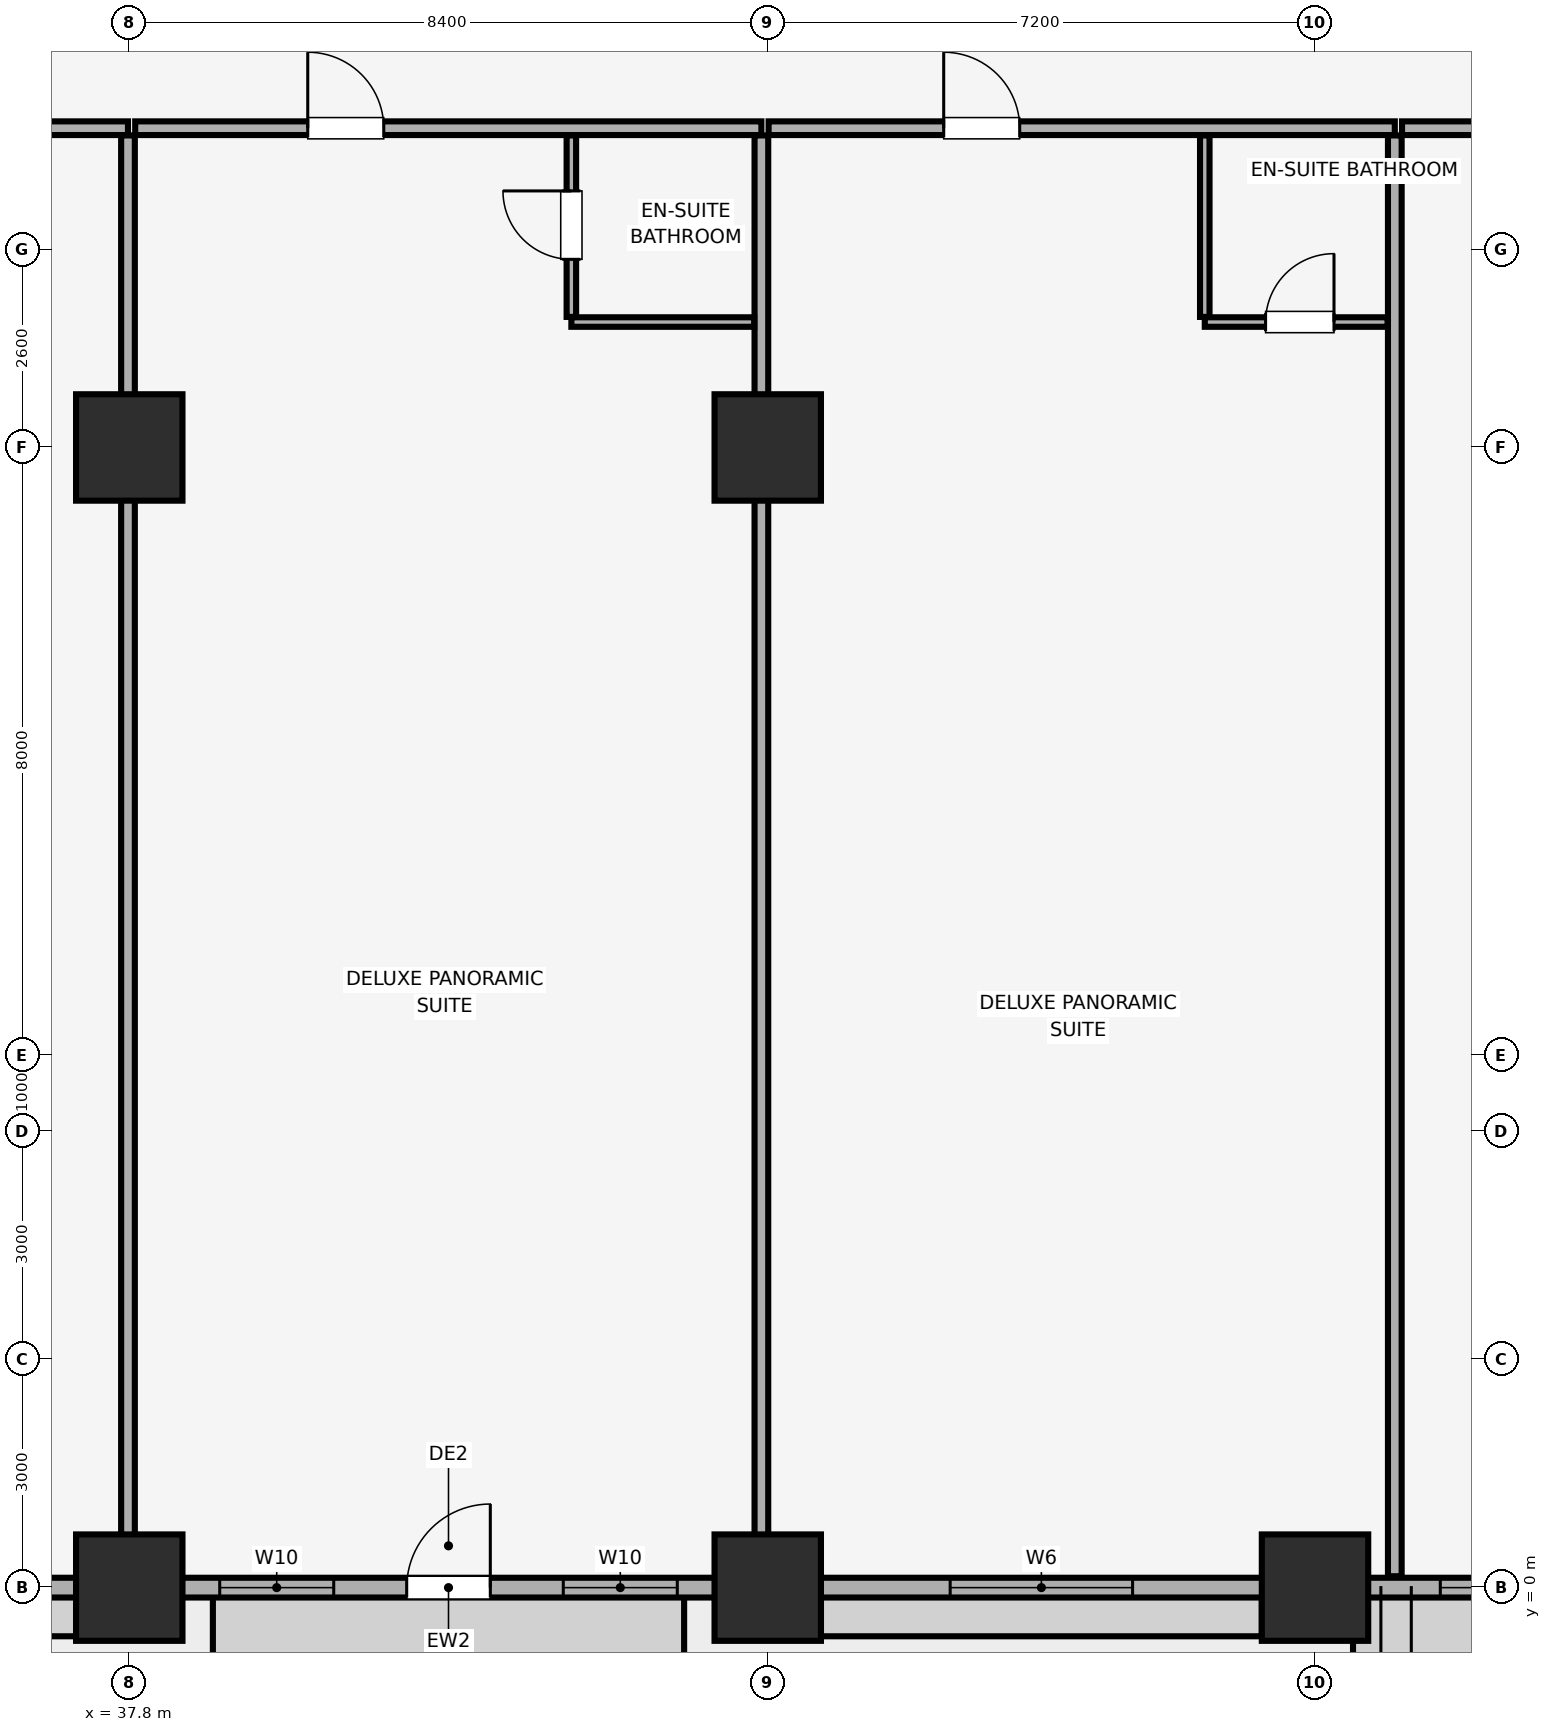
"""IFC4 building model, lengths in metres.
Left out: names, types, materials, properties, quantities, classifications, styles, units other than length and angle.
Written with IfcOpenShell. Run it as: python <this file> out.ifc"""

import sys

from ifc_helpers import new_model, si_unit, direction, frame, frame_2d, origin, origin_2d, place, context, subcontext, project, spatial, rectangle, extrude, element, fill, save


model = new_model("IFC4")
c1 = context("Model", 3, precision=1e-05, world=origin(), true_north=direction((0.0, 1.0)))
c2 = subcontext(c1, "Body", "Model", "MODEL_VIEW")
j1 = project(units=[si_unit("LENGTHUNIT", "METRE"), si_unit("PLANEANGLEUNIT", "RADIAN")], contexts=[c1])
p1 = place(None, origin())
s1 = spatial("IfcSite", under=j1, at=p1, CompositionType="ELEMENT")
p2 = place(p1, origin())
s2 = spatial("IfcBuilding", under=s1, at=p2, CompositionType="ELEMENT")
p3 = place(p2, frame((0.0, 0.0, 72.65)))
s3 = spatial("IfcBuildingStorey", under=s2, at=p3, CompositionType="ELEMENT", Elevation=72.65)
for number, where, z_axis, x_axis in (
    (1, (37.8, 0.0, 0.0), (0.0, 0.0, 1.0), (1.0, 0.0, 0.0)),
    (2, (46.2, 0.0, 0.0), (0.0, 0.0, 1.0), (1.0, 0.0, 0.0)),
    (3, (53.4, 0.0, 0.0), (0.0, 0.0, 1.0), (1.0, 0.0, 0.0)),
    (4, (37.8, 15.0, 0.0), (0.0, 0.0, 1.0), (1.0, 0.0, 0.0)),
    (5, (46.2, 15.0, 0.0), (0.0, 0.0, 1.0), (1.0, 0.0, 0.0)),
):
    element("IfcColumn", number, at=place(p3, frame(where, z_axis=z_axis, x_axis=x_axis)), inside=s3, PredefinedType="COLUMN", context=c2, shape_type="SweptSolid", body=[
        extrude(rectangle(XDim=1.4, YDim=1.4, at=origin_2d()), origin(), (0.0, 0.0, 1.0), 3.51),
    ])
p4 = place(p3, frame((4.2, 0.0, 0.0), z_axis=(0.0, 0.0, 1.0), x_axis=(1.0, 0.0, 0.0)))
e6 = element("IfcWall", 6, at=p4, inside=s3, PredefinedType="SOLIDWALL", context=c2, shape_type="SweptSolid", body=[
    extrude(rectangle(XDim=75.6, YDim=0.26, at=frame_2d((37.8, 0.0))), origin(), (0.0, 0.0, 1.0), 2.56),
])
p5 = place(p4, frame((21.383, 0.0, 0.0)))
e7 = element("IfcOpeningElement", 7, at=p5, cuts=e6, PredefinedType="OPENING", context=c2, shape_type="SweptSolid", body=[
    extrude(rectangle(XDim=1.1, YDim=2.15, at=frame_2d((0.55, 1.075))), frame((0.0, 0.14, 0.0), z_axis=(0.0, -1.0, 0.0), x_axis=(1.0, 0.0, 0.0)), (0.0, 0.0, 1.0), 0.28),
])
p6 = place(p4, frame((37.25, 0.0, 0.0)))
e8 = element("IfcOpeningElement", 8, at=p6, cuts=e6, PredefinedType="OPENING", context=c2, shape_type="SweptSolid", body=[
    extrude(rectangle(XDim=1.1, YDim=2.15, at=frame_2d((0.55, 1.075))), frame((0.0, 0.14, 0.0), z_axis=(0.0, -1.0, 0.0), x_axis=(1.0, 0.0, 0.0)), (0.0, 0.0, 1.0), 0.28),
])
p7 = place(p4, frame((53.117, 0.0, 0.0)))
e9 = element("IfcOpeningElement", 9, at=p7, cuts=e6, PredefinedType="OPENING", context=c2, shape_type="SweptSolid", body=[
    extrude(rectangle(XDim=1.1, YDim=2.15, at=frame_2d((0.55, 1.075))), frame((0.0, 0.14, 0.0), z_axis=(0.0, -1.0, 0.0), x_axis=(1.0, 0.0, 0.0)), (0.0, 0.0, 1.0), 0.28),
])
p8 = place(p4, frame((1.035, 0.0, 0.85)))
e10 = element("IfcOpeningElement", 10, at=p8, cuts=e6, PredefinedType="OPENING", context=c2, shape_type="SweptSolid", body=[
    extrude(rectangle(XDim=2.4, YDim=1.5, at=frame_2d((1.2, 0.75))), frame((0.0, 0.14, 0.0), z_axis=(0.0, -1.0, 0.0), x_axis=(1.0, 0.0, 0.0)), (0.0, 0.0, 1.0), 0.28),
])
p9 = place(p4, frame((5.691, 0.0, 0.85)))
e11 = element("IfcOpeningElement", 11, at=p9, cuts=e6, PredefinedType="OPENING", context=c2, shape_type="SweptSolid", body=[
    extrude(rectangle(XDim=2.4, YDim=1.5, at=frame_2d((1.2, 0.75))), frame((0.0, 0.14, 0.0), z_axis=(0.0, -1.0, 0.0), x_axis=(1.0, 0.0, 0.0)), (0.0, 0.0, 1.0), 0.28),
])
p10 = place(p4, frame((9.342, 0.0, 0.85)))
e12 = element("IfcOpeningElement", 12, at=p10, cuts=e6, PredefinedType="OPENING", context=c2, shape_type="SweptSolid", body=[
    extrude(rectangle(XDim=1.5, YDim=1.4, at=frame_2d((0.75, 0.7))), frame((0.0, 0.14, 0.0), z_axis=(0.0, -1.0, 0.0), x_axis=(1.0, 0.0, 0.0)), (0.0, 0.0, 1.0), 0.28),
])
p11 = place(p4, frame((13.458, 0.0, 0.85)))
e13 = element("IfcOpeningElement", 13, at=p11, cuts=e6, PredefinedType="OPENING", context=c2, shape_type="SweptSolid", body=[
    extrude(rectangle(XDim=2.4, YDim=1.5, at=frame_2d((1.2, 0.75))), frame((0.0, 0.14, 0.0), z_axis=(0.0, -1.0, 0.0), x_axis=(1.0, 0.0, 0.0)), (0.0, 0.0, 1.0), 0.28),
])
p12 = place(p4, frame((23.202, 0.0, 0.85)))
e14 = element("IfcOpeningElement", 14, at=p12, cuts=e6, PredefinedType="OPENING", context=c2, shape_type="SweptSolid", body=[
    extrude(rectangle(XDim=1.5, YDim=1.4, at=frame_2d((0.75, 0.7))), frame((0.0, 0.14, 0.0), z_axis=(0.0, -1.0, 0.0), x_axis=(1.0, 0.0, 0.0)), (0.0, 0.0, 1.0), 0.28),
])
p13 = place(p4, frame((28.8, 0.0, 0.85)))
e15 = element("IfcOpeningElement", 15, at=p13, cuts=e6, PredefinedType="OPENING", context=c2, shape_type="SweptSolid", body=[
    extrude(rectangle(XDim=2.4, YDim=1.5, at=frame_2d((1.2, 0.75))), frame((0.0, 0.14, 0.0), z_axis=(0.0, -1.0, 0.0), x_axis=(1.0, 0.0, 0.0)), (0.0, 0.0, 1.0), 0.28),
])
p14 = place(p4, frame((34.79, 0.0, 0.85)))
e16 = element("IfcOpeningElement", 16, at=p14, cuts=e6, PredefinedType="OPENING", context=c2, shape_type="SweptSolid", body=[
    extrude(rectangle(XDim=1.5, YDim=1.4, at=frame_2d((0.75, 0.7))), frame((0.0, 0.14, 0.0), z_axis=(0.0, -1.0, 0.0), x_axis=(1.0, 0.0, 0.0)), (0.0, 0.0, 1.0), 0.28),
])
p15 = place(p4, frame((39.31, 0.0, 0.85)))
e17 = element("IfcOpeningElement", 17, at=p15, cuts=e6, PredefinedType="OPENING", context=c2, shape_type="SweptSolid", body=[
    extrude(rectangle(XDim=1.5, YDim=1.4, at=frame_2d((0.75, 0.7))), frame((0.0, 0.14, 0.0), z_axis=(0.0, -1.0, 0.0), x_axis=(1.0, 0.0, 0.0)), (0.0, 0.0, 1.0), 0.28),
])
p16 = place(p4, frame((44.4, 0.0, 0.85)))
e18 = element("IfcOpeningElement", 18, at=p16, cuts=e6, PredefinedType="OPENING", context=c2, shape_type="SweptSolid", body=[
    extrude(rectangle(XDim=2.4, YDim=1.5, at=frame_2d((1.2, 0.75))), frame((0.0, 0.14, 0.0), z_axis=(0.0, -1.0, 0.0), x_axis=(1.0, 0.0, 0.0)), (0.0, 0.0, 1.0), 0.28),
])
p17 = place(p4, frame((50.848, 0.0, 0.85)))
e19 = element("IfcOpeningElement", 19, at=p17, cuts=e6, PredefinedType="OPENING", context=c2, shape_type="SweptSolid", body=[
    extrude(rectangle(XDim=1.5, YDim=1.4, at=frame_2d((0.75, 0.7))), frame((0.0, 0.14, 0.0), z_axis=(0.0, -1.0, 0.0), x_axis=(1.0, 0.0, 0.0)), (0.0, 0.0, 1.0), 0.28),
])
p18 = place(p4, frame((59.691, 0.0, 0.85)))
e20 = element("IfcOpeningElement", 20, at=p18, cuts=e6, PredefinedType="OPENING", context=c2, shape_type="SweptSolid", body=[
    extrude(rectangle(XDim=2.4, YDim=1.5, at=frame_2d((1.2, 0.75))), frame((0.0, 0.14, 0.0), z_axis=(0.0, -1.0, 0.0), x_axis=(1.0, 0.0, 0.0)), (0.0, 0.0, 1.0), 0.28),
])
p19 = place(p4, frame((64.708, 0.0, 0.85)))
e21 = element("IfcOpeningElement", 21, at=p19, cuts=e6, PredefinedType="OPENING", context=c2, shape_type="SweptSolid", body=[
    extrude(rectangle(XDim=1.5, YDim=1.4, at=frame_2d((0.75, 0.7))), frame((0.0, 0.14, 0.0), z_axis=(0.0, -1.0, 0.0), x_axis=(1.0, 0.0, 0.0)), (0.0, 0.0, 1.0), 0.28),
])
p20 = place(p4, frame((67.458, 0.0, 0.85)))
e22 = element("IfcOpeningElement", 22, at=p20, cuts=e6, PredefinedType="OPENING", context=c2, shape_type="SweptSolid", body=[
    extrude(rectangle(XDim=2.4, YDim=1.5, at=frame_2d((1.2, 0.75))), frame((0.0, 0.14, 0.0), z_axis=(0.0, -1.0, 0.0), x_axis=(1.0, 0.0, 0.0)), (0.0, 0.0, 1.0), 0.28),
])
p21 = place(p4, frame((72.165, 0.0, 0.85)))
e23 = element("IfcOpeningElement", 23, at=p21, cuts=e6, PredefinedType="OPENING", context=c2, shape_type="SweptSolid", body=[
    extrude(rectangle(XDim=2.4, YDim=1.5, at=frame_2d((1.2, 0.75))), frame((0.0, 0.14, 0.0), z_axis=(0.0, -1.0, 0.0), x_axis=(1.0, 0.0, 0.0)), (0.0, 0.0, 1.0), 0.28),
])
p22 = place(p3, frame((29.545, 19.2, 0.0), z_axis=(0.0, 0.0, 1.0), x_axis=(1.0, 0.0, 0.0)))
e24 = element("IfcWall", 24, at=p22, inside=s3, PredefinedType="PARTITIONING", context=c2, shape_type="SweptSolid", body=[
    extrude(rectangle(XDim=8.238, YDim=0.18, at=frame_2d((4.119, 0.0))), origin(), (0.0, 0.0, 1.0), 3.51),
])
p23 = place(p22, frame((4.89, 0.0, 0.0)))
e25 = element("IfcOpeningElement", 25, at=p23, cuts=e24, PredefinedType="OPENING", context=c2, shape_type="SweptSolid", body=[
    extrude(rectangle(XDim=1.0, YDim=2.15, at=frame_2d((0.5, 1.075))), frame((0.0, 0.1, 0.0), z_axis=(0.0, -1.0, 0.0), x_axis=(1.0, 0.0, 0.0)), (0.0, 0.0, 1.0), 0.2),
])
p24 = place(p3, frame((37.783, 0.15, 0.0), z_axis=(0.0, 0.0, 1.0), x_axis=(0.0, 1.0, 0.0)))
e26 = element("IfcWall", 26, at=p24, inside=s3, PredefinedType="PARTITIONING", context=c2, shape_type="SweptSolid", body=[
    extrude(rectangle(XDim=18.955, YDim=0.18, at=frame_2d((9.478, 0.0))), origin(), (0.0, 0.0, 1.0), 2.898),
])
p25 = place(p3, frame((37.878, 19.2, 0.0), z_axis=(0.0, 0.0, 1.0), x_axis=(1.0, 0.0, 0.0)))
e27 = element("IfcWall", 27, at=p25, inside=s3, PredefinedType="PARTITIONING", context=c2, shape_type="SweptSolid", body=[
    extrude(rectangle(XDim=8.238, YDim=0.18, at=frame_2d((4.119, 0.0))), origin(), (0.0, 0.0, 1.0), 3.51),
])
p26 = place(p25, frame((2.27, 0.0, 0.0)))
e28 = element("IfcOpeningElement", 28, at=p26, cuts=e27, PredefinedType="OPENING", context=c2, shape_type="SweptSolid", body=[
    extrude(rectangle(XDim=1.0, YDim=2.15, at=frame_2d((0.5, 1.075))), frame((0.0, 0.1, 0.0), z_axis=(0.0, -1.0, 0.0), x_axis=(1.0, 0.0, 0.0)), (0.0, 0.0, 1.0), 0.2),
])
p27 = place(p3, frame((46.116, 0.15, 0.0), z_axis=(0.0, 0.0, 1.0), x_axis=(0.0, 1.0, 0.0)))
e29 = element("IfcWall", 29, at=p27, inside=s3, PredefinedType="PARTITIONING", context=c2, shape_type="SweptSolid", body=[
    extrude(rectangle(XDim=18.955, YDim=0.18, at=frame_2d((9.478, 0.0))), origin(), (0.0, 0.0, 1.0), 2.898),
])
p28 = place(p3, frame((43.616, 16.65, 0.0), z_axis=(0.0, 0.0, 1.0), x_axis=(1.0, 0.0, 0.0)))
e30 = element("IfcWall", 30, at=p28, inside=s3, PredefinedType="PARTITIONING", context=c2, shape_type="SweptSolid", body=[
    extrude(rectangle(XDim=2.405, YDim=0.125, at=frame_2d((1.203, 0.0))), origin(), (0.0, 0.0, 1.0), 3.51),
])
p29 = place(p3, frame((43.616, 16.718, 0.0), z_axis=(0.0, 0.0, 1.0), x_axis=(0.0, 1.0, 0.0)))
e31 = element("IfcWall", 31, at=p29, inside=s3, PredefinedType="PARTITIONING", context=c2, shape_type="SweptSolid", body=[
    extrude(rectangle(XDim=2.387, YDim=0.125, at=frame_2d((1.194, 0.0))), origin(), (0.0, 0.0, 1.0), 3.51),
])
p30 = place(p29, frame((0.758, 0.0, 0.0)))
e32 = element("IfcOpeningElement", 32, at=p30, cuts=e31, PredefinedType="OPENING", context=c2, shape_type="SweptSolid", body=[
    extrude(rectangle(XDim=0.9, YDim=2.1, at=frame_2d((0.45, 1.05))), frame((0.0, 0.073, 0.0), z_axis=(0.0, -1.0, 0.0), x_axis=(1.0, 0.0, 0.0)), (0.0, 0.0, 1.0), 0.145),
])
p31 = place(p3, frame((46.211, 19.2, 0.0), z_axis=(0.0, 0.0, 1.0), x_axis=(1.0, 0.0, 0.0)))
e33 = element("IfcWall", 33, at=p31, inside=s3, PredefinedType="PARTITIONING", context=c2, shape_type="SweptSolid", body=[
    extrude(rectangle(XDim=8.238, YDim=0.18, at=frame_2d((4.119, 0.0))), origin(), (0.0, 0.0, 1.0), 3.51),
])
p32 = place(p31, frame((2.303, 0.0, 0.0)))
e34 = element("IfcOpeningElement", 34, at=p32, cuts=e33, PredefinedType="OPENING", context=c2, shape_type="SweptSolid", body=[
    extrude(rectangle(XDim=1.0, YDim=2.15, at=frame_2d((0.5, 1.075))), frame((0.0, 0.1, 0.0), z_axis=(0.0, -1.0, 0.0), x_axis=(1.0, 0.0, 0.0)), (0.0, 0.0, 1.0), 0.2),
])
p33 = place(p3, frame((54.45, 0.15, 0.0), z_axis=(0.0, 0.0, 1.0), x_axis=(0.0, 1.0, 0.0)))
e35 = element("IfcWall", 35, at=p33, inside=s3, PredefinedType="PARTITIONING", context=c2, shape_type="SweptSolid", body=[
    extrude(rectangle(XDim=18.955, YDim=0.18, at=frame_2d((9.478, 0.0))), origin(), (0.0, 0.0, 1.0), 3.51),
])
p34 = place(p3, frame((51.95, 16.65, 0.0), z_axis=(0.0, 0.0, 1.0), x_axis=(1.0, 0.0, 0.0)))
e36 = element("IfcWall", 36, at=p34, inside=s3, PredefinedType="PARTITIONING", context=c2, shape_type="SweptSolid", body=[
    extrude(rectangle(XDim=2.405, YDim=0.125, at=frame_2d((1.203, 0.0))), origin(), (0.0, 0.0, 1.0), 3.51),
])
p35 = place(p34, frame((0.8, 0.0, 0.0)))
e37 = element("IfcOpeningElement", 37, at=p35, cuts=e36, PredefinedType="OPENING", context=c2, shape_type="SweptSolid", body=[
    extrude(rectangle(XDim=0.9, YDim=2.1, at=frame_2d((0.45, 1.05))), frame((0.0, 0.073, 0.0), z_axis=(0.0, -1.0, 0.0), x_axis=(1.0, 0.0, 0.0)), (0.0, 0.0, 1.0), 0.145),
])
p36 = place(p3, frame((51.95, 16.718, 0.0), z_axis=(0.0, 0.0, 1.0), x_axis=(0.0, 1.0, 0.0)))
e38 = element("IfcWall", 38, at=p36, inside=s3, PredefinedType="PARTITIONING", context=c2, shape_type="SweptSolid", body=[
    extrude(rectangle(XDim=2.387, YDim=0.125, at=frame_2d((1.194, 0.0))), origin(), (0.0, 0.0, 1.0), 3.51),
])
p37 = place(p3, frame((54.545, 19.2, 0.0), z_axis=(0.0, 0.0, 1.0), x_axis=(1.0, 0.0, 0.0)))
e39 = element("IfcWall", 39, at=p37, inside=s3, PredefinedType="PARTITIONING", context=c2, shape_type="SweptSolid", body=[
    extrude(rectangle(XDim=8.238, YDim=0.18, at=frame_2d((4.119, 0.0))), origin(), (0.0, 0.0, 1.0), 3.51),
])
p38 = place(p37, frame((1.872, 0.0, 0.0)))
e40 = element("IfcOpeningElement", 40, at=p38, cuts=e39, PredefinedType="OPENING", context=c2, shape_type="SweptSolid", body=[
    extrude(rectangle(XDim=1.0, YDim=2.15, at=frame_2d((0.5, 1.075))), frame((0.0, 0.1, 0.0), z_axis=(0.0, -1.0, 0.0), x_axis=(1.0, 0.0, 0.0)), (0.0, 0.0, 1.0), 0.2),
])
p39 = place(p6, origin())
e41 = element("IfcDoor", 41, at=p39, inside=s3, OperationType="SINGLE_SWING_RIGHT", PredefinedType="DOOR", context=c2, shape_type="SweptSolid", body=[
    extrude(rectangle(XDim=1.1, YDim=2.15, at=frame_2d((0.55, 1.075))), frame((0.0, 0.025, 0.0), z_axis=(0.0, -1.0, 0.0), x_axis=(1.0, 0.0, 0.0)), (0.0, 0.0, 1.0), 0.05),
])
fill(e8, e41)
p40 = place(p14, origin())
e42 = element("IfcWindow", 42, at=p40, inside=s3, PartitioningType="SINGLE_PANEL", PredefinedType="WINDOW", context=c2, shape_type="SweptSolid", body=[
    extrude(rectangle(XDim=1.5, YDim=1.4, at=frame_2d((0.75, 0.7))), frame((0.0, 0.03, 0.0), z_axis=(0.0, -1.0, 0.0), x_axis=(1.0, 0.0, 0.0)), (0.0, 0.0, 1.0), 0.06),
])
fill(e16, e42)
p41 = place(p15, origin())
e43 = element("IfcWindow", 43, at=p41, inside=s3, PartitioningType="SINGLE_PANEL", PredefinedType="WINDOW", context=c2, shape_type="SweptSolid", body=[
    extrude(rectangle(XDim=1.5, YDim=1.4, at=frame_2d((0.75, 0.7))), frame((0.0, 0.03, 0.0), z_axis=(0.0, -1.0, 0.0), x_axis=(1.0, 0.0, 0.0)), (0.0, 0.0, 1.0), 0.06),
])
fill(e17, e43)
p42 = place(p16, origin())
e44 = element("IfcWindow", 44, at=p42, inside=s3, PartitioningType="SINGLE_PANEL", PredefinedType="WINDOW", context=c2, shape_type="SweptSolid", body=[
    extrude(rectangle(XDim=2.4, YDim=1.5, at=frame_2d((1.2, 0.75))), frame((0.0, 0.03, 0.0), z_axis=(0.0, -1.0, 0.0), x_axis=(1.0, 0.0, 0.0)), (0.0, 0.0, 1.0), 0.06),
])
fill(e18, e44)
p43 = place(p17, origin())
e45 = element("IfcWindow", 45, at=p43, inside=s3, PartitioningType="SINGLE_PANEL", PredefinedType="WINDOW", context=c2, shape_type="SweptSolid", body=[
    extrude(rectangle(XDim=1.5, YDim=1.4, at=frame_2d((0.75, 0.7))), frame((0.0, 0.03, 0.0), z_axis=(0.0, -1.0, 0.0), x_axis=(1.0, 0.0, 0.0)), (0.0, 0.0, 1.0), 0.06),
])
fill(e19, e45)
p44 = place(p26, origin())
e46 = element("IfcDoor", 46, at=p44, inside=s3, OperationType="SINGLE_SWING_LEFT", PredefinedType="DOOR", context=c2, shape_type="SweptSolid", body=[
    extrude(rectangle(XDim=1.0, YDim=2.15, at=frame_2d((0.5, 1.075))), frame((0.0, 0.025, 0.0), z_axis=(0.0, -1.0, 0.0), x_axis=(1.0, 0.0, 0.0)), (0.0, 0.0, 1.0), 0.05),
])
fill(e28, e46)
p45 = place(p30, origin())
e47 = element("IfcDoor", 47, at=p45, inside=s3, OperationType="SINGLE_SWING_RIGHT", PredefinedType="DOOR", context=c2, shape_type="SweptSolid", body=[
    extrude(rectangle(XDim=0.9, YDim=2.1, at=frame_2d((0.45, 1.05))), frame((0.0, 0.025, 0.0), z_axis=(0.0, -1.0, 0.0), x_axis=(1.0, 0.0, 0.0)), (0.0, 0.0, 1.0), 0.05),
])
fill(e32, e47)
p46 = place(p32, origin())
e48 = element("IfcDoor", 48, at=p46, inside=s3, OperationType="SINGLE_SWING_LEFT", PredefinedType="DOOR", context=c2, shape_type="SweptSolid", body=[
    extrude(rectangle(XDim=1.0, YDim=2.15, at=frame_2d((0.5, 1.075))), frame((0.0, 0.025, 0.0), z_axis=(0.0, -1.0, 0.0), x_axis=(1.0, 0.0, 0.0)), (0.0, 0.0, 1.0), 0.05),
])
fill(e34, e48)
p47 = place(p35, origin())
e49 = element("IfcDoor", 49, at=p47, inside=s3, OperationType="SINGLE_SWING_RIGHT", PredefinedType="DOOR", context=c2, shape_type="SweptSolid", body=[
    extrude(rectangle(XDim=0.9, YDim=2.1, at=frame_2d((0.45, 1.05))), frame((0.0, 0.025, 0.0), z_axis=(0.0, -1.0, 0.0), x_axis=(1.0, 0.0, 0.0)), (0.0, 0.0, 1.0), 0.05),
])
fill(e37, e49)
save(model, sys.argv[1])
